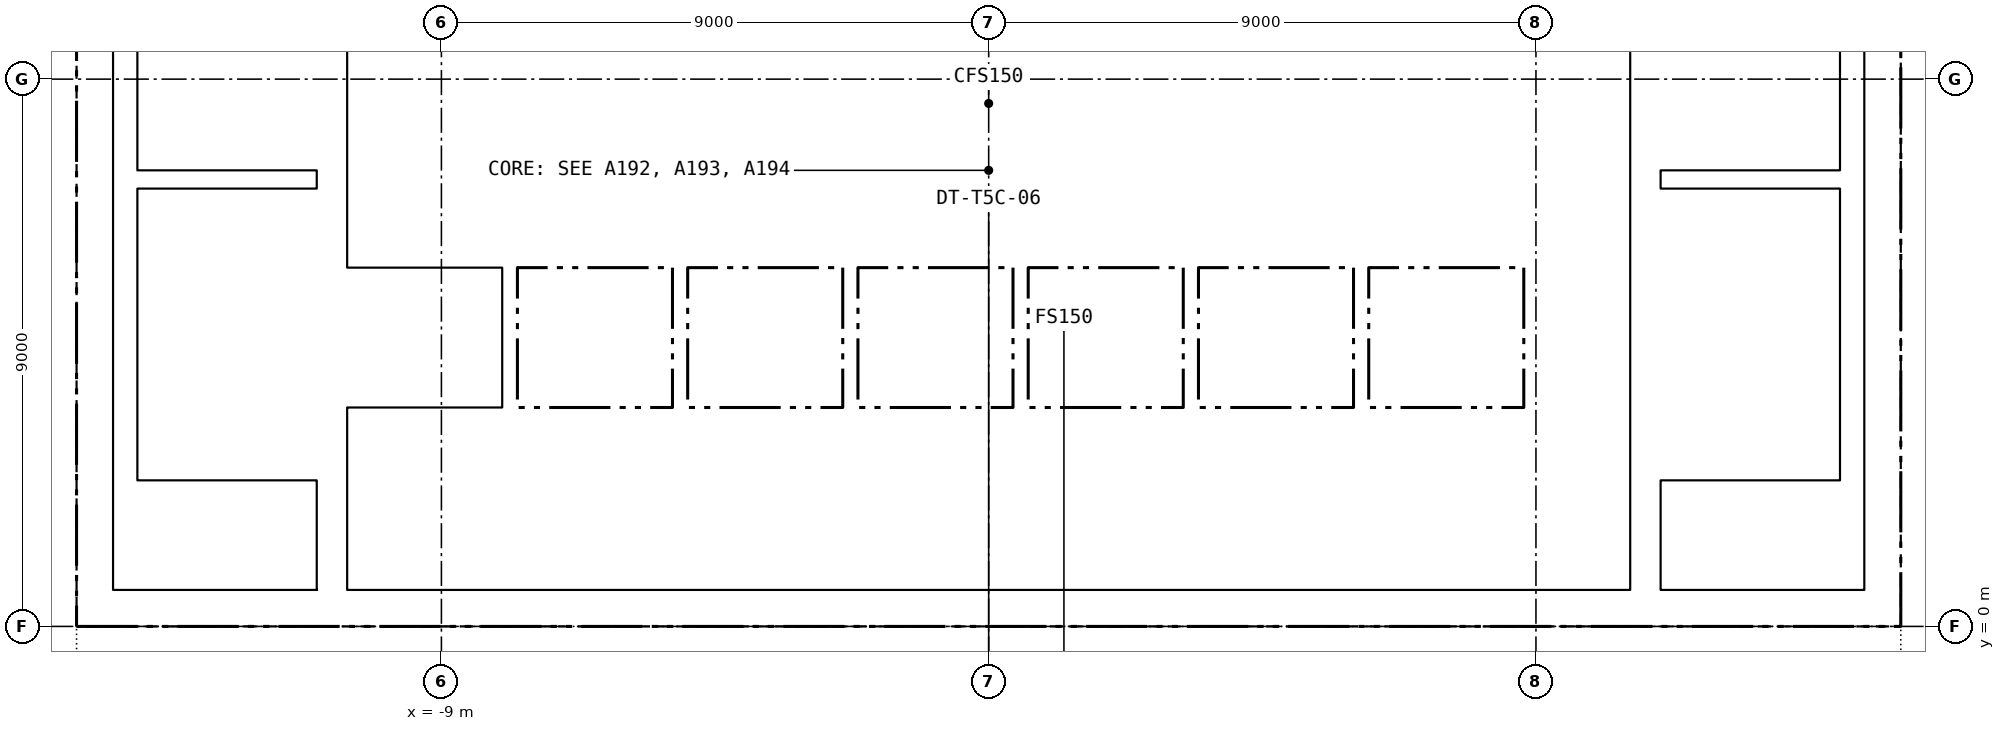
"""IFC4 building model, lengths in metres.
Left out: names, types, materials, properties, quantities, classifications, styles, units other than length and angle.
Written with IfcOpenShell. Run it as: python <this file> out.ifc"""

import sys

from ifc_helpers import new_model, si_unit, direction, frame, frame_2d, origin, place, context, subcontext, project, spatial, rectangle, extrude, element, fill, save


model = new_model("IFC4")
c1 = context("Model", 3, precision=1e-05, world=origin(), true_north=direction((0.0, 1.0)))
c2 = subcontext(c1, "Body", "Model", "MODEL_VIEW")
j1 = project(units=[si_unit("LENGTHUNIT", "METRE"), si_unit("PLANEANGLEUNIT", "RADIAN")], contexts=[c1])
p1 = place(None, origin())
s1 = spatial("IfcSite", under=j1, at=p1, CompositionType="ELEMENT")
p2 = place(p1, origin())
s2 = spatial("IfcBuilding", under=s1, at=p2, CompositionType="ELEMENT")
p3 = place(p2, frame((0.0, 0.0, 238.2)))
s3 = spatial("IfcBuildingStorey", under=s2, at=p3, CompositionType="ELEMENT", Elevation=238.2)
p4 = place(p3, frame((-15.0, 0.3, -0.15), z_axis=(0.0, 0.0, 1.0), x_axis=(1.0, 0.0, 0.0)))
e1 = element("IfcWall", 1, at=p4, inside=s3, PredefinedType="SOLIDWALL", context=c2, shape_type="SweptSolid", body=[
    extrude(rectangle(XDim=30.0, YDim=0.6, at=frame_2d((15.0, 0.0))), origin(), (0.0, 0.0, 1.0), 3.65),
])
p5 = place(p4, frame((5.8, 0.0, 0.15)))
e2 = element("IfcOpeningElement", 2, at=p5, cuts=e1, PredefinedType="OPENING", context=c2, shape_type="SweptSolid", body=[
    extrude(rectangle(XDim=2.4, YDim=2.4, at=frame_2d((1.2, 1.2))), frame((0.0, 0.31, 0.0), z_axis=(0.0, -1.0, 0.0), x_axis=(1.0, 0.0, 0.0)), (0.0, 0.0, 1.0), 0.62),
])
p6 = place(p4, frame((13.8, 0.0, 0.15)))
e3 = element("IfcOpeningElement", 3, at=p6, cuts=e1, PredefinedType="OPENING", context=c2, shape_type="SweptSolid", body=[
    extrude(rectangle(XDim=2.4, YDim=2.4, at=frame_2d((1.2, 1.2))), frame((0.0, 0.31, 0.0), z_axis=(0.0, -1.0, 0.0), x_axis=(1.0, 0.0, 0.0)), (0.0, 0.0, 1.0), 0.62),
])
p7 = place(p4, frame((21.8, 0.0, 0.15)))
e4 = element("IfcOpeningElement", 4, at=p7, cuts=e1, PredefinedType="OPENING", context=c2, shape_type="SweptSolid", body=[
    extrude(rectangle(XDim=2.4, YDim=2.4, at=frame_2d((1.2, 1.2))), frame((0.0, 0.31, 0.0), z_axis=(0.0, -1.0, 0.0), x_axis=(1.0, 0.0, 0.0)), (0.0, 0.0, 1.0), 0.62),
])
p8 = place(p4, frame((1.5, 0.0, 0.15)))
e5 = element("IfcOpeningElement", 5, at=p8, cuts=e1, PredefinedType="OPENING", context=c2, shape_type="SweptSolid", body=[
    extrude(rectangle(XDim=1.2, YDim=2.1, at=frame_2d((0.6, 1.05))), frame((0.0, 0.31, 0.0), z_axis=(0.0, -1.0, 0.0), x_axis=(1.0, 0.0, 0.0)), (0.0, 0.0, 1.0), 0.62),
])
p9 = place(p4, frame((27.3, 0.0, 0.15)))
e6 = element("IfcOpeningElement", 6, at=p9, cuts=e1, PredefinedType="OPENING", context=c2, shape_type="SweptSolid", body=[
    extrude(rectangle(XDim=1.2, YDim=2.1, at=frame_2d((0.6, 1.05))), frame((0.0, 0.31, 0.0), z_axis=(0.0, -1.0, 0.0), x_axis=(1.0, 0.0, 0.0)), (0.0, 0.0, 1.0), 0.62),
])
for number, where, z_axis, x_axis in (
    (7, (-14.7, 0.6, -0.15), (0.0, 0.0, 1.0), (0.0, 1.0, 0.0)),
    (8, (14.7, 0.6, -0.15), (0.0, 0.0, 1.0), (0.0, 1.0, 0.0)),
):
    element("IfcWall", number, at=place(p3, frame(where, z_axis=z_axis, x_axis=x_axis)), inside=s3, PredefinedType="SOLIDWALL", context=c2, shape_type="SweptSolid", body=[
        extrude(rectangle(XDim=13.8, YDim=0.6, at=frame_2d((6.9, 0.0))), origin(), (0.0, 0.0, 1.0), 3.65),
    ])
for number, where, z_axis, x_axis in (
    (9, (-10.8, 0.6, -0.15), (0.0, 0.0, 1.0), (0.0, 1.0, 0.0)),
    (10, (10.8, 0.6, -0.15), (0.0, 0.0, 1.0), (0.0, 1.0, 0.0)),
):
    element("IfcWall", number, at=place(p3, frame(where, z_axis=z_axis, x_axis=x_axis)), inside=s3, PredefinedType="SOLIDWALL", context=c2, shape_type="SweptSolid", body=[
        extrude(rectangle(XDim=13.8, YDim=0.5, at=frame_2d((6.9, 0.0))), origin(), (0.0, 0.0, 1.0), 3.65),
    ])
p10 = place(p3, frame((-10.55, 3.5, 0.0), z_axis=(0.0, 0.0, 1.0), x_axis=(1.0, 0.0, 0.0)))
e11 = element("IfcWall", 11, at=p10, inside=s3, PredefinedType="PARTITIONING", context=c2, shape_type="SweptSolid", body=[
    extrude(rectangle(XDim=21.1, YDim=0.2, at=frame_2d((10.55, 0.0))), origin(), (0.0, 0.0, 1.0), 3.5),
])
p11 = place(p10, frame((0.675, 0.0, 0.0)))
e12 = element("IfcOpeningElement", 12, at=p11, cuts=e11, PredefinedType="OPENING", context=c2, shape_type="SweptSolid", body=[
    extrude(rectangle(XDim=1.2, YDim=2.1, at=frame_2d((0.6, 1.05))), frame((0.0, 0.11, 0.0), z_axis=(0.0, -1.0, 0.0), x_axis=(1.0, 0.0, 0.0)), (0.0, 0.0, 1.0), 0.22),
])
p12 = place(p10, frame((3.475, 0.0, 0.0)))
e13 = element("IfcOpeningElement", 13, at=p12, cuts=e11, PredefinedType="OPENING", context=c2, shape_type="SweptSolid", body=[
    extrude(rectangle(XDim=1.2, YDim=2.1, at=frame_2d((0.6, 1.05))), frame((0.0, 0.11, 0.0), z_axis=(0.0, -1.0, 0.0), x_axis=(1.0, 0.0, 0.0)), (0.0, 0.0, 1.0), 0.22),
])
p13 = place(p10, frame((6.275, 0.0, 0.0)))
e14 = element("IfcOpeningElement", 14, at=p13, cuts=e11, PredefinedType="OPENING", context=c2, shape_type="SweptSolid", body=[
    extrude(rectangle(XDim=1.2, YDim=2.1, at=frame_2d((0.6, 1.05))), frame((0.0, 0.11, 0.0), z_axis=(0.0, -1.0, 0.0), x_axis=(1.0, 0.0, 0.0)), (0.0, 0.0, 1.0), 0.22),
])
p14 = place(p10, frame((9.075, 0.0, 0.0)))
e15 = element("IfcOpeningElement", 15, at=p14, cuts=e11, PredefinedType="OPENING", context=c2, shape_type="SweptSolid", body=[
    extrude(rectangle(XDim=1.2, YDim=2.1, at=frame_2d((0.6, 1.05))), frame((0.0, 0.11, 0.0), z_axis=(0.0, -1.0, 0.0), x_axis=(1.0, 0.0, 0.0)), (0.0, 0.0, 1.0), 0.22),
])
p15 = place(p10, frame((11.875, 0.0, 0.0)))
e16 = element("IfcOpeningElement", 16, at=p15, cuts=e11, PredefinedType="OPENING", context=c2, shape_type="SweptSolid", body=[
    extrude(rectangle(XDim=1.2, YDim=2.1, at=frame_2d((0.6, 1.05))), frame((0.0, 0.11, 0.0), z_axis=(0.0, -1.0, 0.0), x_axis=(1.0, 0.0, 0.0)), (0.0, 0.0, 1.0), 0.22),
])
p16 = place(p10, frame((14.675, 0.0, 0.0)))
e17 = element("IfcOpeningElement", 17, at=p16, cuts=e11, PredefinedType="OPENING", context=c2, shape_type="SweptSolid", body=[
    extrude(rectangle(XDim=1.2, YDim=2.1, at=frame_2d((0.6, 1.05))), frame((0.0, 0.11, 0.0), z_axis=(0.0, -1.0, 0.0), x_axis=(1.0, 0.0, 0.0)), (0.0, 0.0, 1.0), 0.22),
])
p17 = place(p10, frame((17.475, 0.0, 0.0)))
e18 = element("IfcOpeningElement", 18, at=p17, cuts=e11, PredefinedType="OPENING", context=c2, shape_type="SweptSolid", body=[
    extrude(rectangle(XDim=1.2, YDim=2.1, at=frame_2d((0.6, 1.05))), frame((0.0, 0.11, 0.0), z_axis=(0.0, -1.0, 0.0), x_axis=(1.0, 0.0, 0.0)), (0.0, 0.0, 1.0), 0.22),
])
p18 = place(p10, frame((19.9, 0.0, 0.0)))
e19 = element("IfcOpeningElement", 19, at=p18, cuts=e11, PredefinedType="OPENING", context=c2, shape_type="SweptSolid", body=[
    extrude(rectangle(XDim=0.9, YDim=2.1, at=frame_2d((0.45, 1.05))), frame((0.0, 0.11, 0.0), z_axis=(0.0, -1.0, 0.0), x_axis=(1.0, 0.0, 0.0)), (0.0, 0.0, 1.0), 0.22),
])
p19 = place(p3, frame((-10.55, 6.025, 0.0), z_axis=(0.0, 0.0, 1.0), x_axis=(1.0, 0.0, 0.0)))
e20 = element("IfcWall", 20, at=p19, inside=s3, PredefinedType="PARTITIONING", context=c2, shape_type="SweptSolid", body=[
    extrude(rectangle(XDim=21.1, YDim=0.25, at=frame_2d((10.55, 0.0))), origin(), (0.0, 0.0, 1.0), 3.5),
])
p20 = place(p3, frame((-4.125, 8.55, 0.0), z_axis=(0.0, 0.0, 1.0), x_axis=(1.0, 0.0, 0.0)))
e21 = element("IfcWall", 21, at=p20, inside=s3, PredefinedType="PARTITIONING", context=c2, shape_type="SweptSolid", body=[
    extrude(rectangle(XDim=14.675, YDim=0.2, at=frame_2d((7.337, 0.0))), origin(), (0.0, 0.0, 1.0), 3.5),
])
p21 = place(p20, frame((1.413, 0.0, 0.0)))
e22 = element("IfcOpeningElement", 22, at=p21, cuts=e21, PredefinedType="OPENING", context=c2, shape_type="SweptSolid", body=[
    extrude(rectangle(XDim=1.0, YDim=2.1, at=frame_2d((0.5, 1.05))), frame((0.0, 0.11, 0.0), z_axis=(0.0, -1.0, 0.0), x_axis=(1.0, 0.0, 0.0)), (0.0, 0.0, 1.0), 0.22),
])
p22 = place(p20, frame((5.0, 0.0, 0.0)))
e23 = element("IfcOpeningElement", 23, at=p22, cuts=e21, PredefinedType="OPENING", context=c2, shape_type="SweptSolid", body=[
    extrude(rectangle(XDim=1.0, YDim=2.1, at=frame_2d((0.5, 1.05))), frame((0.0, 0.11, 0.0), z_axis=(0.0, -1.0, 0.0), x_axis=(1.0, 0.0, 0.0)), (0.0, 0.0, 1.0), 0.22),
])
p23 = place(p20, frame((9.613, 0.0, 0.0)))
e24 = element("IfcOpeningElement", 24, at=p23, cuts=e21, PredefinedType="OPENING", context=c2, shape_type="SweptSolid", body=[
    extrude(rectangle(XDim=1.0, YDim=2.1, at=frame_2d((0.5, 1.05))), frame((0.0, 0.11, 0.0), z_axis=(0.0, -1.0, 0.0), x_axis=(1.0, 0.0, 0.0)), (0.0, 0.0, 1.0), 0.22),
])
p24 = place(p20, frame((13.475, 0.0, 0.0)))
e25 = element("IfcOpeningElement", 25, at=p24, cuts=e21, PredefinedType="OPENING", context=c2, shape_type="SweptSolid", body=[
    extrude(rectangle(XDim=0.9, YDim=2.1, at=frame_2d((0.45, 1.05))), frame((0.0, 0.11, 0.0), z_axis=(0.0, -1.0, 0.0), x_axis=(1.0, 0.0, 0.0)), (0.0, 0.0, 1.0), 0.22),
])
p25 = place(p3, frame((-4.125, 6.15, 0.0), z_axis=(0.0, 0.0, 1.0), x_axis=(0.0, 1.0, 0.0)))
e26 = element("IfcWall", 26, at=p25, inside=s3, PredefinedType="PARTITIONING", context=c2, shape_type="SweptSolid", body=[
    extrude(rectangle(XDim=4.95, YDim=0.25, at=frame_2d((2.475, 0.0))), origin(), (0.0, 0.0, 1.0), 3.5),
])
p26 = place(p25, frame((3.125, 0.0, 0.0)))
e27 = element("IfcOpeningElement", 27, at=p26, cuts=e26, PredefinedType="OPENING", context=c2, shape_type="SweptSolid", body=[
    extrude(rectangle(XDim=1.2, YDim=2.1, at=frame_2d((0.6, 1.05))), frame((0.0, 0.135, 0.0), z_axis=(0.0, -1.0, 0.0), x_axis=(1.0, 0.0, 0.0)), (0.0, 0.0, 1.0), 0.27),
])
for number, where, z_axis, x_axis in (
    (28, (-7.875, 3.6, 0.0), (0.0, 0.0, 1.0), (0.0, 1.0, 0.0)),
    (29, (-5.075, 3.6, 0.0), (0.0, 0.0, 1.0), (0.0, 1.0, 0.0)),
    (30, (-2.275, 3.6, 0.0), (0.0, 0.0, 1.0), (0.0, 1.0, 0.0)),
    (31, (0.525, 3.6, 0.0), (0.0, 0.0, 1.0), (0.0, 1.0, 0.0)),
    (32, (3.325, 3.6, 0.0), (0.0, 0.0, 1.0), (0.0, 1.0, 0.0)),
    (33, (6.125, 3.6, 0.0), (0.0, 0.0, 1.0), (0.0, 1.0, 0.0)),
    (34, (8.925, 3.6, 0.0), (0.0, 0.0, 1.0), (0.0, 1.0, 0.0)),
):
    element("IfcWall", number, at=place(p3, frame(where, z_axis=z_axis, x_axis=x_axis)), inside=s3, PredefinedType="PARTITIONING", context=c2, shape_type="SweptSolid", body=[
        extrude(rectangle(XDim=2.3, YDim=0.25, at=frame_2d((1.15, 0.0))), origin(), (0.0, 0.0, 1.0), 3.5),
    ])
for number, where, z_axis, x_axis in (
    (35, (-0.35, 6.15, 0.0), (0.0, 0.0, 1.0), (0.0, 1.0, 0.0)),
    (36, (3.1, 6.15, 0.0), (0.0, 0.0, 1.0), (0.0, 1.0, 0.0)),
):
    element("IfcWall", number, at=place(p3, frame(where, z_axis=z_axis, x_axis=x_axis)), inside=s3, PredefinedType="PARTITIONING", context=c2, shape_type="SweptSolid", body=[
        extrude(rectangle(XDim=2.3, YDim=0.15, at=frame_2d((1.15, 0.0))), origin(), (0.0, 0.0, 1.0), 3.5),
    ])
p27 = place(p3, frame((8.925, 6.15, 0.0), z_axis=(0.0, 0.0, 1.0), x_axis=(0.0, 1.0, 0.0)))
e37 = element("IfcWall", 37, at=p27, inside=s3, PredefinedType="PARTITIONING", context=c2, shape_type="SweptSolid", body=[
    extrude(rectangle(XDim=2.3, YDim=0.25, at=frame_2d((1.15, 0.0))), origin(), (0.0, 0.0, 1.0), 3.5),
])
p28 = place(p3, frame((-14.0, 7.35, 0.0), z_axis=(0.0, 0.0, 1.0), x_axis=(1.0, 0.0, 0.0)))
e38 = element("IfcWall", 38, at=p28, inside=s3, PredefinedType="SOLIDWALL", context=c2, shape_type="SweptSolid", body=[
    extrude(rectangle(XDim=2.95, YDim=0.3, at=frame_2d((1.475, 0.0))), origin(), (0.0, 0.0, 1.0), 3.5),
])
p29 = place(p3, frame((-14.2, 0.6, 0.0), z_axis=(0.0, 0.0, 1.0), x_axis=(0.0, 1.0, 0.0)))
e39 = element("IfcWall", 39, at=p29, inside=s3, PredefinedType="SOLIDWALL", context=c2, shape_type="SweptSolid", body=[
    extrude(rectangle(XDim=13.8, YDim=0.4, at=frame_2d((6.9, 0.0))), origin(), (0.0, 0.0, 1.0), 3.5),
])
p30 = place(p3, frame((11.05, 7.35, 0.0), z_axis=(0.0, 0.0, 1.0), x_axis=(1.0, 0.0, 0.0)))
e40 = element("IfcWall", 40, at=p30, inside=s3, PredefinedType="SOLIDWALL", context=c2, shape_type="SweptSolid", body=[
    extrude(rectangle(XDim=2.95, YDim=0.3, at=frame_2d((1.475, 0.0))), origin(), (0.0, 0.0, 1.0), 3.5),
])
p31 = place(p3, frame((14.2, 0.6, 0.0), z_axis=(0.0, 0.0, 1.0), x_axis=(0.0, 1.0, 0.0)))
e41 = element("IfcWall", 41, at=p31, inside=s3, PredefinedType="SOLIDWALL", context=c2, shape_type="SweptSolid", body=[
    extrude(rectangle(XDim=13.8, YDim=0.4, at=frame_2d((6.9, 0.0))), origin(), (0.0, 0.0, 1.0), 3.5),
])
p32 = place(p26, origin())
e42 = element("IfcDoor", 42, at=p32, inside=s3, OperationType="SINGLE_SWING_LEFT", PredefinedType="DOOR", context=c2, shape_type="SweptSolid", body=[
    extrude(rectangle(XDim=1.2, YDim=2.1, at=frame_2d((0.6, 1.05))), frame((0.0, 0.025, 0.0), z_axis=(0.0, -1.0, 0.0), x_axis=(1.0, 0.0, 0.0)), (0.0, 0.0, 1.0), 0.05),
])
fill(e27, e42)
p33 = place(p11, origin())
e43 = element("IfcDoor", 43, at=p33, inside=s3, OperationType="DOUBLE_DOOR_SLIDING", PredefinedType="DOOR", context=c2, shape_type="SweptSolid", body=[
    extrude(rectangle(XDim=1.2, YDim=2.1, at=frame_2d((0.6, 1.05))), frame((0.0, 0.025, 0.0), z_axis=(0.0, -1.0, 0.0), x_axis=(1.0, 0.0, 0.0)), (0.0, 0.0, 1.0), 0.05),
])
fill(e12, e43)
p34 = place(p12, origin())
e44 = element("IfcDoor", 44, at=p34, inside=s3, OperationType="DOUBLE_DOOR_SLIDING", PredefinedType="DOOR", context=c2, shape_type="SweptSolid", body=[
    extrude(rectangle(XDim=1.2, YDim=2.1, at=frame_2d((0.6, 1.05))), frame((0.0, 0.025, 0.0), z_axis=(0.0, -1.0, 0.0), x_axis=(1.0, 0.0, 0.0)), (0.0, 0.0, 1.0), 0.05),
])
fill(e13, e44)
p35 = place(p13, origin())
e45 = element("IfcDoor", 45, at=p35, inside=s3, OperationType="DOUBLE_DOOR_SLIDING", PredefinedType="DOOR", context=c2, shape_type="SweptSolid", body=[
    extrude(rectangle(XDim=1.2, YDim=2.1, at=frame_2d((0.6, 1.05))), frame((0.0, 0.025, 0.0), z_axis=(0.0, -1.0, 0.0), x_axis=(1.0, 0.0, 0.0)), (0.0, 0.0, 1.0), 0.05),
])
fill(e14, e45)
p36 = place(p14, origin())
e46 = element("IfcDoor", 46, at=p36, inside=s3, OperationType="DOUBLE_DOOR_SLIDING", PredefinedType="DOOR", context=c2, shape_type="SweptSolid", body=[
    extrude(rectangle(XDim=1.2, YDim=2.1, at=frame_2d((0.6, 1.05))), frame((0.0, 0.025, 0.0), z_axis=(0.0, -1.0, 0.0), x_axis=(1.0, 0.0, 0.0)), (0.0, 0.0, 1.0), 0.05),
])
fill(e15, e46)
p37 = place(p15, origin())
e47 = element("IfcDoor", 47, at=p37, inside=s3, OperationType="DOUBLE_DOOR_SLIDING", PredefinedType="DOOR", context=c2, shape_type="SweptSolid", body=[
    extrude(rectangle(XDim=1.2, YDim=2.1, at=frame_2d((0.6, 1.05))), frame((0.0, 0.025, 0.0), z_axis=(0.0, -1.0, 0.0), x_axis=(1.0, 0.0, 0.0)), (0.0, 0.0, 1.0), 0.05),
])
fill(e16, e47)
p38 = place(p16, origin())
e48 = element("IfcDoor", 48, at=p38, inside=s3, OperationType="DOUBLE_DOOR_SLIDING", PredefinedType="DOOR", context=c2, shape_type="SweptSolid", body=[
    extrude(rectangle(XDim=1.2, YDim=2.1, at=frame_2d((0.6, 1.05))), frame((0.0, 0.025, 0.0), z_axis=(0.0, -1.0, 0.0), x_axis=(1.0, 0.0, 0.0)), (0.0, 0.0, 1.0), 0.05),
])
fill(e17, e48)
p39 = place(p17, origin())
e49 = element("IfcDoor", 49, at=p39, inside=s3, OperationType="DOUBLE_DOOR_SLIDING", PredefinedType="DOOR", context=c2, shape_type="SweptSolid", body=[
    extrude(rectangle(XDim=1.2, YDim=2.1, at=frame_2d((0.6, 1.05))), frame((0.0, 0.025, 0.0), z_axis=(0.0, -1.0, 0.0), x_axis=(1.0, 0.0, 0.0)), (0.0, 0.0, 1.0), 0.05),
])
fill(e18, e49)
p40 = place(p18, origin())
e50 = element("IfcDoor", 50, at=p40, inside=s3, OperationType="SINGLE_SWING_RIGHT", PredefinedType="DOOR", context=c2, shape_type="SweptSolid", body=[
    extrude(rectangle(XDim=0.9, YDim=2.1, at=frame_2d((0.45, 1.05))), frame((0.0, 0.025, 0.0), z_axis=(0.0, -1.0, 0.0), x_axis=(1.0, 0.0, 0.0)), (0.0, 0.0, 1.0), 0.05),
])
fill(e19, e50)
p41 = place(p21, origin())
e51 = element("IfcDoor", 51, at=p41, inside=s3, OperationType="SINGLE_SWING_LEFT", PredefinedType="DOOR", context=c2, shape_type="SweptSolid", body=[
    extrude(rectangle(XDim=1.0, YDim=2.1, at=frame_2d((0.5, 1.05))), frame((0.0, 0.025, 0.0), z_axis=(0.0, -1.0, 0.0), x_axis=(1.0, 0.0, 0.0)), (0.0, 0.0, 1.0), 0.05),
])
fill(e22, e51)
p42 = place(p22, origin())
e52 = element("IfcDoor", 52, at=p42, inside=s3, OperationType="SINGLE_SWING_RIGHT", PredefinedType="DOOR", context=c2, shape_type="SweptSolid", body=[
    extrude(rectangle(XDim=1.0, YDim=2.1, at=frame_2d((0.5, 1.05))), frame((0.0, 0.025, 0.0), z_axis=(0.0, -1.0, 0.0), x_axis=(1.0, 0.0, 0.0)), (0.0, 0.0, 1.0), 0.05),
])
fill(e23, e52)
p43 = place(p23, origin())
e53 = element("IfcDoor", 53, at=p43, inside=s3, OperationType="SINGLE_SWING_LEFT", PredefinedType="DOOR", context=c2, shape_type="SweptSolid", body=[
    extrude(rectangle(XDim=1.0, YDim=2.1, at=frame_2d((0.5, 1.05))), frame((0.0, 0.025, 0.0), z_axis=(0.0, -1.0, 0.0), x_axis=(1.0, 0.0, 0.0)), (0.0, 0.0, 1.0), 0.05),
])
fill(e24, e53)
p44 = place(p24, origin())
e54 = element("IfcDoor", 54, at=p44, inside=s3, OperationType="SINGLE_SWING_RIGHT", PredefinedType="DOOR", context=c2, shape_type="SweptSolid", body=[
    extrude(rectangle(XDim=0.9, YDim=2.1, at=frame_2d((0.45, 1.05))), frame((0.0, 0.025, 0.0), z_axis=(0.0, -1.0, 0.0), x_axis=(1.0, 0.0, 0.0)), (0.0, 0.0, 1.0), 0.05),
])
fill(e25, e54)
p45 = place(p5, origin())
e55 = element("IfcDoor", 55, at=p45, inside=s3, OperationType="DOUBLE_DOOR_DOUBLE_SWING", PredefinedType="DOOR", context=c2, shape_type="SweptSolid", body=[
    extrude(rectangle(XDim=2.4, YDim=2.4, at=frame_2d((1.2, 1.2))), frame((0.0, 0.025, 0.0), z_axis=(0.0, -1.0, 0.0), x_axis=(1.0, 0.0, 0.0)), (0.0, 0.0, 1.0), 0.05),
])
fill(e2, e55)
p46 = place(p6, origin())
e56 = element("IfcDoor", 56, at=p46, inside=s3, OperationType="DOUBLE_DOOR_DOUBLE_SWING", PredefinedType="DOOR", context=c2, shape_type="SweptSolid", body=[
    extrude(rectangle(XDim=2.4, YDim=2.4, at=frame_2d((1.2, 1.2))), frame((0.0, 0.025, 0.0), z_axis=(0.0, -1.0, 0.0), x_axis=(1.0, 0.0, 0.0)), (0.0, 0.0, 1.0), 0.05),
])
fill(e3, e56)
p47 = place(p7, origin())
e57 = element("IfcDoor", 57, at=p47, inside=s3, OperationType="DOUBLE_DOOR_DOUBLE_SWING", PredefinedType="DOOR", context=c2, shape_type="SweptSolid", body=[
    extrude(rectangle(XDim=2.4, YDim=2.4, at=frame_2d((1.2, 1.2))), frame((0.0, 0.025, 0.0), z_axis=(0.0, -1.0, 0.0), x_axis=(1.0, 0.0, 0.0)), (0.0, 0.0, 1.0), 0.05),
])
fill(e4, e57)
p48 = place(p8, origin())
e58 = element("IfcDoor", 58, at=p48, inside=s3, OperationType="SINGLE_SWING_LEFT", PredefinedType="DOOR", context=c2, shape_type="SweptSolid", body=[
    extrude(rectangle(XDim=1.2, YDim=2.1, at=frame_2d((0.6, 1.05))), frame((0.0, 0.025, 0.0), z_axis=(0.0, -1.0, 0.0), x_axis=(1.0, 0.0, 0.0)), (0.0, 0.0, 1.0), 0.05),
])
fill(e5, e58)
p49 = place(p9, origin())
e59 = element("IfcDoor", 59, at=p49, inside=s3, OperationType="SINGLE_SWING_RIGHT", PredefinedType="DOOR", context=c2, shape_type="SweptSolid", body=[
    extrude(rectangle(XDim=1.2, YDim=2.1, at=frame_2d((0.6, 1.05))), frame((0.0, 0.025, 0.0), z_axis=(0.0, -1.0, 0.0), x_axis=(1.0, 0.0, 0.0)), (0.0, 0.0, 1.0), 0.05),
])
fill(e6, e59)
save(model, sys.argv[1])
